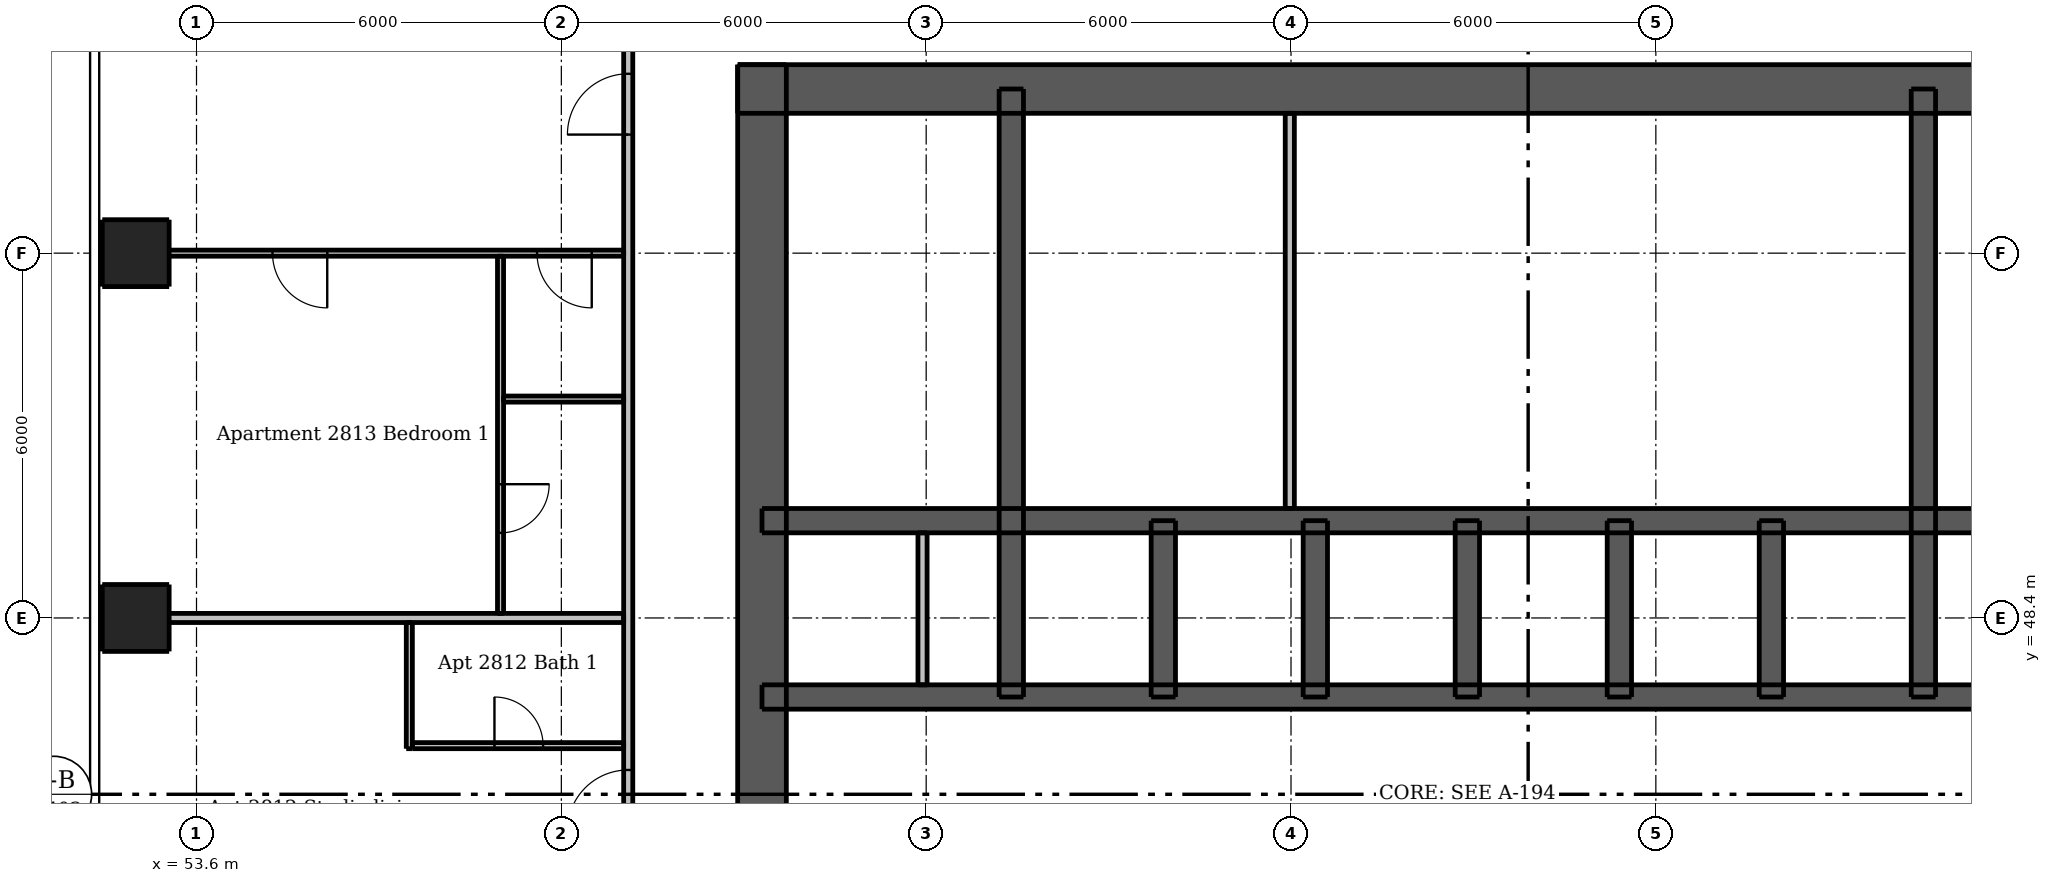
"""IFC4 building model, lengths in metres.
Left out: names, types, materials, properties, quantities, classifications, styles, units other than length and angle.
Written with IfcOpenShell. Run it as: python <this file> out.ifc"""

import sys

from ifc_helpers import new_model, si_unit, direction, frame, frame_2d, origin, origin_2d, place, context, subcontext, project, spatial, rectangle, extrude, element, fill, save


model = new_model("IFC4")
c1 = context("Model", 3, precision=1e-05, world=origin(), true_north=direction((0.0, 1.0)))
c2 = subcontext(c1, "Body", "Model", "MODEL_VIEW")
j1 = project(units=[si_unit("LENGTHUNIT", "METRE"), si_unit("PLANEANGLEUNIT", "RADIAN")], contexts=[c1])
p1 = place(None, origin())
s1 = spatial("IfcSite", under=j1, at=p1, CompositionType="ELEMENT")
p2 = place(p1, origin())
s2 = spatial("IfcBuilding", under=s1, at=p2, CompositionType="ELEMENT")
p3 = place(p2, frame((0.0, 0.0, 105.1)))
s3 = spatial("IfcBuildingStorey", under=s2, at=p3, CompositionType="ELEMENT", Elevation=105.1)
p4 = place(p3, frame((62.5, 57.1, 0.0), z_axis=(0.0, 0.0, 1.0), x_axis=(1.0, 0.0, 0.0)))
e1 = element("IfcWall", 1, at=p4, inside=s3, PredefinedType="SHEAR", context=c2, shape_type="SweptSolid", body=[
    extrude(rectangle(XDim=24.0, YDim=0.8, at=frame_2d((12.0, 0.0))), origin(), (0.0, 0.0, 1.0), 3.05),
])
p5 = place(p4, frame((20.9, 0.0, 0.0)))
e2 = element("IfcOpeningElement", 2, at=p5, cuts=e1, PredefinedType="OPENING", context=c2, shape_type="SweptSolid", body=[
    extrude(rectangle(XDim=1.1, YDim=2.1, at=frame_2d((0.55, 1.05))), frame((0.0, 0.41, 0.0), z_axis=(0.0, -1.0, 0.0), x_axis=(1.0, 0.0, 0.0)), (0.0, 0.0, 1.0), 0.82),
])
p6 = place(p4, frame((2.0, 0.0, 0.0)))
e3 = element("IfcOpeningElement", 3, at=p6, cuts=e1, PredefinedType="OPENING", context=c2, shape_type="SweptSolid", body=[
    extrude(rectangle(XDim=1.1, YDim=2.1, at=frame_2d((0.55, 1.05))), frame((0.0, 0.41, 0.0), z_axis=(0.0, -1.0, 0.0), x_axis=(1.0, 0.0, 0.0)), (0.0, 0.0, 1.0), 0.82),
])
p7 = place(p4, frame((6.44, 0.0, 0.0)))
e4 = element("IfcOpeningElement", 4, at=p7, cuts=e1, PredefinedType="OPENING", context=c2, shape_type="SweptSolid", body=[
    extrude(rectangle(XDim=0.9, YDim=2.1, at=frame_2d((0.45, 1.05))), frame((0.0, 0.41, 0.0), z_axis=(0.0, -1.0, 0.0), x_axis=(1.0, 0.0, 0.0)), (0.0, 0.0, 1.0), 0.82),
])
p8 = place(p4, frame((13.74, 0.0, 0.0)))
e5 = element("IfcOpeningElement", 5, at=p8, cuts=e1, PredefinedType="OPENING", context=c2, shape_type="SweptSolid", body=[
    extrude(rectangle(XDim=0.9, YDim=2.1, at=frame_2d((0.45, 1.05))), frame((0.0, 0.41, 0.0), z_axis=(0.0, -1.0, 0.0), x_axis=(1.0, 0.0, 0.0)), (0.0, 0.0, 1.0), 0.82),
])
p9 = place(p3, frame((62.9, 33.5, 0.0), z_axis=(0.0, 0.0, 1.0), x_axis=(0.0, 1.0, 0.0)))
e6 = element("IfcWall", 6, at=p9, inside=s3, PredefinedType="SHEAR", context=c2, shape_type="SweptSolid", body=[
    extrude(rectangle(XDim=24.0, YDim=0.8, at=frame_2d((12.0, 0.0))), origin(), (0.0, 0.0, 1.0), 3.05),
])
p10 = place(p9, frame((11.2, 0.0, 0.0)))
e7 = element("IfcOpeningElement", 7, at=p10, cuts=e6, PredefinedType="OPENING", context=c2, shape_type="SweptSolid", body=[
    extrude(rectangle(XDim=1.6, YDim=2.1, at=frame_2d((0.8, 1.05))), frame((0.0, 0.41, 0.0), z_axis=(0.0, -1.0, 0.0), x_axis=(1.0, 0.0, 0.0)), (0.0, 0.0, 1.0), 0.82),
])
p11 = place(p3, frame((62.9, 47.1, 0.0), z_axis=(0.0, 0.0, 1.0), x_axis=(1.0, 0.0, 0.0)))
e8 = element("IfcWall", 8, at=p11, inside=s3, PredefinedType="SHEAR", context=c2, shape_type="SweptSolid", body=[
    extrude(rectangle(XDim=23.2, YDim=0.4, at=frame_2d((11.6, 0.0))), origin(), (0.0, 0.0, 1.0), 3.05),
])
p12 = place(p11, frame((1.07, 0.0, 0.0)))
e9 = element("IfcOpeningElement", 9, at=p12, cuts=e8, PredefinedType="OPENING", context=c2, shape_type="SweptSolid", body=[
    extrude(rectangle(XDim=0.9, YDim=2.1, at=frame_2d((0.45, 1.05))), frame((0.0, 0.21, 0.0), z_axis=(0.0, -1.0, 0.0), x_axis=(1.0, 0.0, 0.0)), (0.0, 0.0, 1.0), 0.42),
])
p13 = place(p11, frame((2.87, 0.0, 0.0)))
e10 = element("IfcOpeningElement", 10, at=p13, cuts=e8, PredefinedType="OPENING", context=c2, shape_type="SweptSolid", body=[
    extrude(rectangle(XDim=0.8, YDim=2.1, at=frame_2d((0.4, 1.05))), frame((0.0, 0.21, 0.0), z_axis=(0.0, -1.0, 0.0), x_axis=(1.0, 0.0, 0.0)), (0.0, 0.0, 1.0), 0.42),
])
p14 = place(p11, frame((20.6, 0.0, 0.0)))
e11 = element("IfcOpeningElement", 11, at=p14, cuts=e8, PredefinedType="OPENING", context=c2, shape_type="SweptSolid", body=[
    extrude(rectangle(XDim=0.9, YDim=2.1, at=frame_2d((0.45, 1.05))), frame((0.0, 0.21, 0.0), z_axis=(0.0, -1.0, 0.0), x_axis=(1.0, 0.0, 0.0)), (0.0, 0.0, 1.0), 0.42),
])
p15 = place(p3, frame((62.9, 50.0, 0.0), z_axis=(0.0, 0.0, 1.0), x_axis=(1.0, 0.0, 0.0)))
e12 = element("IfcWall", 12, at=p15, inside=s3, PredefinedType="SHEAR", context=c2, shape_type="SweptSolid", body=[
    extrude(rectangle(XDim=23.2, YDim=0.4, at=frame_2d((11.6, 0.0))), origin(), (0.0, 0.0, 1.0), 3.05),
])
for number, where, z_axis, x_axis in (
    (13, (67.0, 47.1, 0.0), (0.0, 0.0, 1.0), (0.0, 1.0, 0.0)),
    (14, (82.0, 47.1, 0.0), (0.0, 0.0, 1.0), (0.0, 1.0, 0.0)),
):
    element("IfcWall", number, at=place(p3, frame(where, z_axis=z_axis, x_axis=x_axis)), inside=s3, PredefinedType="SHEAR", context=c2, shape_type="SweptSolid", body=[
        extrude(rectangle(XDim=10.0, YDim=0.4, at=frame_2d((5.0, 0.0))), origin(), (0.0, 0.0, 1.0), 3.05),
    ])
for number, where, z_axis, x_axis in (
    (15, (69.5, 47.1, 0.0), (0.0, 0.0, 1.0), (0.0, 1.0, 0.0)),
    (16, (72.0, 47.1, 0.0), (0.0, 0.0, 1.0), (0.0, 1.0, 0.0)),
    (17, (74.5, 47.1, 0.0), (0.0, 0.0, 1.0), (0.0, 1.0, 0.0)),
    (18, (77.0, 47.1, 0.0), (0.0, 0.0, 1.0), (0.0, 1.0, 0.0)),
    (19, (79.5, 47.1, 0.0), (0.0, 0.0, 1.0), (0.0, 1.0, 0.0)),
):
    element("IfcWall", number, at=place(p3, frame(where, z_axis=z_axis, x_axis=x_axis)), inside=s3, PredefinedType="SHEAR", context=c2, shape_type="SweptSolid", body=[
        extrude(rectangle(XDim=2.9, YDim=0.4, at=frame_2d((1.45, 0.0))), origin(), (0.0, 0.0, 1.0), 3.05),
    ])
for number, where, z_axis, x_axis in (
    (20, (52.6, 48.4, 0.0), (0.0, 0.0, 1.0), (1.0, 0.0, 0.0)),
    (21, (52.6, 54.4, 0.0), (0.0, 0.0, 1.0), (1.0, 0.0, 0.0)),
):
    element("IfcColumn", number, at=place(p3, frame(where, z_axis=z_axis, x_axis=x_axis)), inside=s3, PredefinedType="COLUMN", context=c2, shape_type="SweptSolid", body=[
        extrude(rectangle(XDim=1.1, YDim=1.1, at=origin_2d()), origin(), (0.0, 0.0, 1.0), 3.05),
    ])
p16 = place(p3, frame((65.54, 47.3, 0.0), z_axis=(0.0, 0.0, 1.0), x_axis=(0.0, 1.0, 0.0)))
e22 = element("IfcWall", 22, at=p16, inside=s3, PredefinedType="PLUMBINGWALL", context=c2, shape_type="SweptSolid", body=[
    extrude(rectangle(XDim=2.5, YDim=0.15, at=frame_2d((1.25, 0.0))), origin(), (0.0, 0.0, 1.0), 3.05),
])
p17 = place(p3, frame((71.58, 50.2, 0.0), z_axis=(0.0, 0.0, 1.0), x_axis=(0.0, 1.0, 0.0)))
e23 = element("IfcWall", 23, at=p17, inside=s3, PredefinedType="PLUMBINGWALL", context=c2, shape_type="SweptSolid", body=[
    extrude(rectangle(XDim=6.5, YDim=0.15, at=frame_2d((3.25, 0.0))), origin(), (0.0, 0.0, 1.0), 3.05),
])
p18 = place(p3, frame((57.1, 46.25, 0.0), z_axis=(0.0, 0.0, 1.0), x_axis=(0.0, 1.0, 0.0)))
e24 = element("IfcWall", 24, at=p18, inside=s3, PredefinedType="PARTITIONING", context=c2, shape_type="SweptSolid", body=[
    extrude(rectangle(XDim=2.075, YDim=0.1, at=frame_2d((1.038, 0.0))), origin(), (0.0, 0.0, 1.0), 3.05),
])
p19 = place(p3, frame((58.6, 54.35, 0.0), z_axis=(0.0, 0.0, 1.0), x_axis=(0.0, -1.0, 0.0)))
e25 = element("IfcWall", 25, at=p19, inside=s3, PredefinedType="PARTITIONING", context=c2, shape_type="SweptSolid", body=[
    extrude(rectangle(XDim=5.875, YDim=0.1, at=frame_2d((2.938, 0.0))), origin(), (0.0, 0.0, 1.0), 3.05),
])
p20 = place(p19, frame((3.75, 0.0, 0.0)))
e26 = element("IfcOpeningElement", 26, at=p20, cuts=e25, PredefinedType="OPENING", context=c2, shape_type="SweptSolid", body=[
    extrude(rectangle(XDim=0.8, YDim=2.1, at=frame_2d((0.4, 1.05))), frame((0.0, 0.06, 0.0), z_axis=(0.0, -1.0, 0.0), x_axis=(1.0, 0.0, 0.0)), (0.0, 0.0, 1.0), 0.12),
])
p21 = place(p3, frame((60.625, 54.4, 0.0), z_axis=(0.0, 0.0, 1.0), x_axis=(-1.0, 0.0, 0.0)))
e27 = element("IfcWall", 27, at=p21, inside=s3, PredefinedType="PARTITIONING", context=c2, shape_type="SweptSolid", body=[
    extrude(rectangle(XDim=8.625, YDim=0.1, at=frame_2d((4.312, 0.0))), origin(), (0.0, 0.0, 1.0), 2.516),
])
p22 = place(p21, frame((0.525, 0.0, 0.0)))
e28 = element("IfcOpeningElement", 28, at=p22, cuts=e27, PredefinedType="OPENING", context=c2, shape_type="SweptSolid", body=[
    extrude(rectangle(XDim=0.9, YDim=2.1, at=frame_2d((0.45, 1.05))), frame((0.0, 0.06, 0.0), z_axis=(0.0, -1.0, 0.0), x_axis=(1.0, 0.0, 0.0)), (0.0, 0.0, 1.0), 0.12),
])
p23 = place(p21, frame((4.875, 0.0, 0.0)))
e29 = element("IfcOpeningElement", 29, at=p23, cuts=e27, PredefinedType="OPENING", context=c2, shape_type="SweptSolid", body=[
    extrude(rectangle(XDim=0.9, YDim=2.1, at=frame_2d((0.45, 1.05))), frame((0.0, 0.06, 0.0), z_axis=(0.0, -1.0, 0.0), x_axis=(1.0, 0.0, 0.0)), (0.0, 0.0, 1.0), 0.12),
])
p24 = place(p3, frame((58.65, 52.0, 0.0), z_axis=(0.0, 0.0, 1.0), x_axis=(1.0, 0.0, 0.0)))
e30 = element("IfcWall", 30, at=p24, inside=s3, PredefinedType="PARTITIONING", context=c2, shape_type="SweptSolid", body=[
    extrude(rectangle(XDim=1.975, YDim=0.1, at=frame_2d((0.988, 0.0))), origin(), (0.0, 0.0, 1.0), 3.05),
])
p25 = place(p3, frame((57.15, 46.3, 0.0), z_axis=(0.0, 0.0, 1.0), x_axis=(1.0, 0.0, 0.0)))
e31 = element("IfcWall", 31, at=p25, inside=s3, PredefinedType="PARTITIONING", context=c2, shape_type="SweptSolid", body=[
    extrude(rectangle(XDim=3.475, YDim=0.1, at=frame_2d((1.738, 0.0))), origin(), (0.0, 0.0, 1.0), 3.05),
])
p26 = place(p25, frame((1.35, 0.0, 0.0)))
e32 = element("IfcOpeningElement", 32, at=p26, cuts=e31, PredefinedType="OPENING", context=c2, shape_type="SweptSolid", body=[
    extrude(rectangle(XDim=0.8, YDim=2.1, at=frame_2d((0.4, 1.05))), frame((0.0, 0.06, 0.0), z_axis=(0.0, -1.0, 0.0), x_axis=(1.0, 0.0, 0.0)), (0.0, 0.0, 1.0), 0.12),
])
p27 = place(p3, frame((60.7, 30.325, 0.0), z_axis=(0.0, 0.0, 1.0), x_axis=(0.0, 1.0, 0.0)))
e33 = element("IfcWall", 33, at=p27, inside=s3, PredefinedType="PARTITIONING", context=c2, shape_type="SweptSolid", body=[
    extrude(rectangle(XDim=28.9, YDim=0.15, at=frame_2d((14.45, 0.0))), origin(), (0.0, 0.0, 1.0), 3.05),
])
p28 = place(p27, frame((2.575, 0.0, 0.0)))
e34 = element("IfcOpeningElement", 34, at=p28, cuts=e33, PredefinedType="OPENING", context=c2, shape_type="SweptSolid", body=[
    extrude(rectangle(XDim=1.0, YDim=2.1, at=frame_2d((0.5, 1.05))), frame((0.0, 0.085, 0.0), z_axis=(0.0, -1.0, 0.0), x_axis=(1.0, 0.0, 0.0)), (0.0, 0.0, 1.0), 0.17),
])
p29 = place(p27, frame((8.575, 0.0, 0.0)))
e35 = element("IfcOpeningElement", 35, at=p29, cuts=e33, PredefinedType="OPENING", context=c2, shape_type="SweptSolid", body=[
    extrude(rectangle(XDim=1.0, YDim=2.1, at=frame_2d((0.5, 1.05))), frame((0.0, 0.085, 0.0), z_axis=(0.0, -1.0, 0.0), x_axis=(1.0, 0.0, 0.0)), (0.0, 0.0, 1.0), 0.17),
])
p30 = place(p27, frame((14.575, 0.0, 0.0)))
e36 = element("IfcOpeningElement", 36, at=p30, cuts=e33, PredefinedType="OPENING", context=c2, shape_type="SweptSolid", body=[
    extrude(rectangle(XDim=1.0, YDim=2.1, at=frame_2d((0.5, 1.05))), frame((0.0, 0.085, 0.0), z_axis=(0.0, -1.0, 0.0), x_axis=(1.0, 0.0, 0.0)), (0.0, 0.0, 1.0), 0.17),
])
p31 = place(p27, frame((26.025, 0.0, 0.0)))
e37 = element("IfcOpeningElement", 37, at=p31, cuts=e33, PredefinedType="OPENING", context=c2, shape_type="SweptSolid", body=[
    extrude(rectangle(XDim=1.0, YDim=2.1, at=frame_2d((0.5, 1.05))), frame((0.0, 0.085, 0.0), z_axis=(0.0, -1.0, 0.0), x_axis=(1.0, 0.0, 0.0)), (0.0, 0.0, 1.0), 0.17),
])
p32 = place(p3, frame((52.0, 48.4, 0.0), z_axis=(0.0, 0.0, 1.0), x_axis=(1.0, 0.0, 0.0)))
e38 = element("IfcWall", 38, at=p32, inside=s3, PredefinedType="PARTITIONING", context=c2, shape_type="SweptSolid", body=[
    extrude(rectangle(XDim=8.625, YDim=0.15, at=frame_2d((4.312, 0.0))), origin(), (0.0, 0.0, 1.0), 2.516),
])
p33 = place(p6, origin())
e39 = element("IfcDoor", 39, at=p33, inside=s3, OperationType="SINGLE_SWING_LEFT", PredefinedType="DOOR", context=c2, shape_type="SweptSolid", body=[
    extrude(rectangle(XDim=1.1, YDim=2.1, at=frame_2d((0.55, 1.05))), frame((0.0, -0.337, 0.0), z_axis=(0.0, -1.0, 0.0), x_axis=(1.0, 0.0, 0.0)), (0.0, 0.0, 1.0), 0.05),
])
fill(e3, e39)
p34 = place(p10, origin())
e40 = element("IfcDoor", 40, at=p34, inside=s3, OperationType="DOUBLE_DOOR_SINGLE_SWING", PredefinedType="DOOR", context=c2, shape_type="SweptSolid", body=[
    extrude(rectangle(XDim=1.6, YDim=2.1, at=frame_2d((0.8, 1.05))), frame((0.0, -0.337, 0.0), z_axis=(0.0, -1.0, 0.0), x_axis=(1.0, 0.0, 0.0)), (0.0, 0.0, 1.0), 0.05),
])
fill(e7, e40)
p35 = place(p12, origin())
e41 = element("IfcDoor", 41, at=p35, inside=s3, OperationType="SINGLE_SWING_LEFT", PredefinedType="DOOR", context=c2, shape_type="SweptSolid", body=[
    extrude(rectangle(XDim=0.9, YDim=2.1, at=frame_2d((0.45, 1.05))), frame((0.0, 0.188, 0.0), z_axis=(0.0, -1.0, 0.0), x_axis=(1.0, 0.0, 0.0)), (0.0, 0.0, 1.0), 0.05),
])
fill(e9, e41)
p36 = place(p13, origin())
e42 = element("IfcDoor", 42, at=p36, inside=s3, OperationType="SINGLE_SWING_RIGHT", PredefinedType="DOOR", context=c2, shape_type="SweptSolid", body=[
    extrude(rectangle(XDim=0.8, YDim=2.1, at=frame_2d((0.4, 1.05))), frame((0.0, 0.188, 0.0), z_axis=(0.0, -1.0, 0.0), x_axis=(1.0, 0.0, 0.0)), (0.0, 0.0, 1.0), 0.05),
])
fill(e10, e42)
p37 = place(p7, origin())
e43 = element("IfcDoor", 43, at=p37, inside=s3, OperationType="SINGLE_SWING_RIGHT", PredefinedType="DOOR", context=c2, shape_type="SweptSolid", body=[
    extrude(rectangle(XDim=0.9, YDim=2.1, at=frame_2d((0.45, 1.05))), frame((0.0, -0.337, 0.0), z_axis=(0.0, -1.0, 0.0), x_axis=(1.0, 0.0, 0.0)), (0.0, 0.0, 1.0), 0.05),
])
fill(e4, e43)
p38 = place(p8, origin())
e44 = element("IfcDoor", 44, at=p38, inside=s3, OperationType="SINGLE_SWING_RIGHT", PredefinedType="DOOR", context=c2, shape_type="SweptSolid", body=[
    extrude(rectangle(XDim=0.9, YDim=2.1, at=frame_2d((0.45, 1.05))), frame((0.0, -0.337, 0.0), z_axis=(0.0, -1.0, 0.0), x_axis=(1.0, 0.0, 0.0)), (0.0, 0.0, 1.0), 0.05),
])
fill(e5, e44)
p39 = place(p30, origin())
e45 = element("IfcDoor", 45, at=p39, inside=s3, OperationType="SINGLE_SWING_LEFT", PredefinedType="DOOR", context=c2, shape_type="SweptSolid", body=[
    extrude(rectangle(XDim=1.0, YDim=2.1, at=frame_2d((0.5, 1.05))), frame((0.0, 0.025, 0.0), z_axis=(0.0, -1.0, 0.0), x_axis=(1.0, 0.0, 0.0)), (0.0, 0.0, 1.0), 0.05),
])
fill(e36, e45)
p40 = place(p26, origin())
e46 = element("IfcDoor", 46, at=p40, inside=s3, OperationType="SINGLE_SWING_LEFT", PredefinedType="DOOR", context=c2, shape_type="SweptSolid", body=[
    extrude(rectangle(XDim=0.8, YDim=2.1, at=frame_2d((0.4, 1.05))), frame((0.0, 0.025, 0.0), z_axis=(0.0, -1.0, 0.0), x_axis=(1.0, 0.0, 0.0)), (0.0, 0.0, 1.0), 0.05),
])
fill(e32, e46)
p41 = place(p31, origin())
e47 = element("IfcDoor", 47, at=p41, inside=s3, OperationType="SINGLE_SWING_LEFT", PredefinedType="DOOR", context=c2, shape_type="SweptSolid", body=[
    extrude(rectangle(XDim=1.0, YDim=2.1, at=frame_2d((0.5, 1.05))), frame((0.0, 0.025, 0.0), z_axis=(0.0, -1.0, 0.0), x_axis=(1.0, 0.0, 0.0)), (0.0, 0.0, 1.0), 0.05),
])
fill(e37, e47)
p42 = place(p22, origin())
e48 = element("IfcDoor", 48, at=p42, inside=s3, OperationType="SINGLE_SWING_LEFT", PredefinedType="DOOR", context=c2, shape_type="SweptSolid", body=[
    extrude(rectangle(XDim=0.9, YDim=2.1, at=frame_2d((0.45, 1.05))), frame((0.0, 0.025, 0.0), z_axis=(0.0, -1.0, 0.0), x_axis=(1.0, 0.0, 0.0)), (0.0, 0.0, 1.0), 0.05),
])
fill(e28, e48)
p43 = place(p23, origin())
e49 = element("IfcDoor", 49, at=p43, inside=s3, OperationType="SINGLE_SWING_LEFT", PredefinedType="DOOR", context=c2, shape_type="SweptSolid", body=[
    extrude(rectangle(XDim=0.9, YDim=2.1, at=frame_2d((0.45, 1.05))), frame((0.0, 0.025, 0.0), z_axis=(0.0, -1.0, 0.0), x_axis=(1.0, 0.0, 0.0)), (0.0, 0.0, 1.0), 0.05),
])
fill(e29, e49)
p44 = place(p20, origin())
e50 = element("IfcDoor", 50, at=p44, inside=s3, OperationType="SINGLE_SWING_LEFT", PredefinedType="DOOR", context=c2, shape_type="SweptSolid", body=[
    extrude(rectangle(XDim=0.8, YDim=2.1, at=frame_2d((0.4, 1.05))), frame((0.0, 0.025, 0.0), z_axis=(0.0, -1.0, 0.0), x_axis=(1.0, 0.0, 0.0)), (0.0, 0.0, 1.0), 0.05),
])
fill(e26, e50)
save(model, sys.argv[1])
